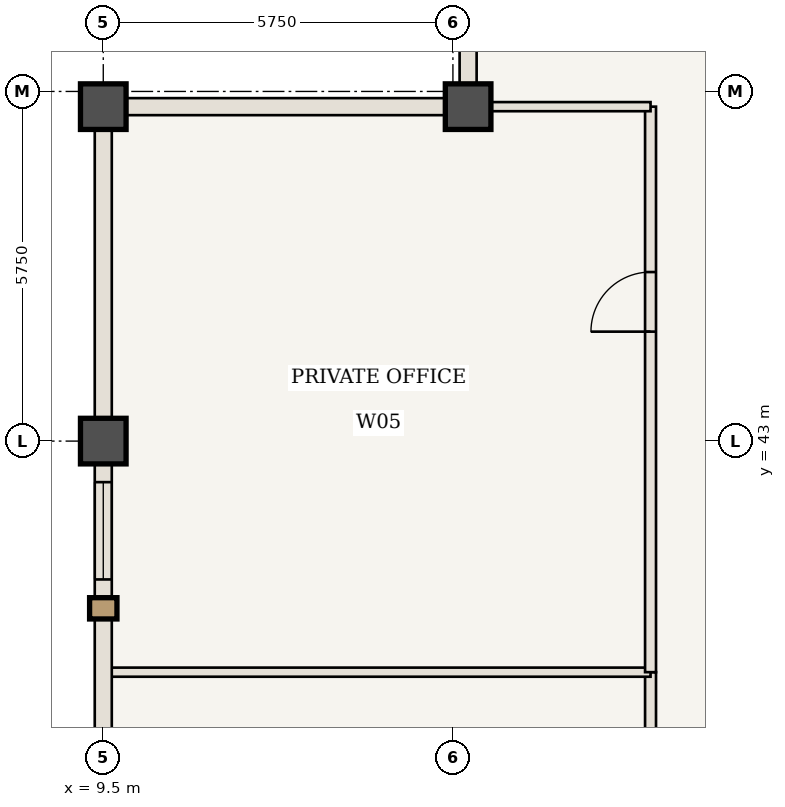
"""IFC4 building model, lengths in metres.
Left out: names, types, materials, properties, quantities, classifications, styles, units other than length and angle.
Written with IfcOpenShell. Run it as: python <this file> out.ifc"""

import sys

from ifc_helpers import new_model, si_unit, direction, frame, frame_2d, origin, origin_2d, place, context, subcontext, project, spatial, rectangle, extrude, element, fill, save


model = new_model("IFC4")
c1 = context("Model", 3, precision=1e-05, world=origin(), true_north=direction((0.0, 1.0)))
c2 = subcontext(c1, "Body", "Model", "MODEL_VIEW")
j1 = project(units=[si_unit("LENGTHUNIT", "METRE"), si_unit("PLANEANGLEUNIT", "RADIAN")], contexts=[c1])
p1 = place(None, origin())
s1 = spatial("IfcSite", under=j1, at=p1, CompositionType="ELEMENT")
p2 = place(p1, origin())
s2 = spatial("IfcBuilding", under=s1, at=p2, CompositionType="ELEMENT")
p3 = place(p2, frame((0.0, 0.0, 289.1)))
s3 = spatial("IfcBuildingStorey", under=s2, at=p3, CompositionType="ELEMENT", Elevation=289.1)
for number, where, z_axis, x_axis in (
    (1, (15.5, 48.5, 0.0), (0.0, 0.0, 1.0), (1.0, 0.0, 0.0)),
    (2, (9.5, 48.5, 0.0), (0.0, 0.0, 1.0), (1.0, 0.0, 0.0)),
    (3, (9.5, 43.0, 0.0), (0.0, 0.0, 1.0), (1.0, 0.0, 0.0)),
):
    element("IfcColumn", number, at=place(p3, frame(where, z_axis=z_axis, x_axis=x_axis)), inside=s3, PredefinedType="COLUMN", context=c2, shape_type="SweptSolid", body=[
        extrude(rectangle(XDim=0.75, YDim=0.75, at=origin_2d()), origin(), (0.0, 0.0, 1.0), 3.85),
    ])
p4 = place(p3, frame((18.5, 32.8, 0.0), z_axis=(0.0, 0.0, 1.0), x_axis=(0.0, 1.0, 0.0)))
e4 = element("IfcWall", 4, at=p4, inside=s3, PredefinedType="STANDARD", context=c2, shape_type="SweptSolid", body=[
    extrude(rectangle(XDim=6.4, YDim=0.18, at=frame_2d((3.2, 0.0))), origin(), (0.0, 0.0, 1.0), 3.685),
])
p5 = place(p4, frame((2.7, 0.0, 0.0)))
e5 = element("IfcOpeningElement", 5, at=p5, cuts=e4, PredefinedType="OPENING", context=c2, shape_type="SweptSolid", body=[
    extrude(rectangle(XDim=0.98, YDim=2.2, at=frame_2d((0.49, 1.1))), frame((0.0, 0.1, 0.0), z_axis=(0.0, -1.0, 0.0), x_axis=(1.0, 0.0, 0.0)), (0.0, 0.0, 1.0), 0.2),
])
p6 = place(p3, frame((9.56, 39.2, 0.0), z_axis=(0.0, 0.0, 1.0), x_axis=(1.0, 0.0, 0.0)))
e6 = element("IfcWall", 6, at=p6, inside=s3, PredefinedType="STANDARD", context=c2, shape_type="SweptSolid", body=[
    extrude(rectangle(XDim=8.94, YDim=0.15, at=frame_2d((4.47, 0.0))), origin(), (0.0, 0.0, 1.0), 3.685),
])
p7 = place(p3, frame((18.5, 39.2, 0.0), z_axis=(0.0, 0.0, 1.0), x_axis=(0.0, 1.0, 0.0)))
e7 = element("IfcWall", 7, at=p7, inside=s3, PredefinedType="STANDARD", context=c2, shape_type="SweptSolid", body=[
    extrude(rectangle(XDim=9.3, YDim=0.18, at=frame_2d((4.65, 0.0))), origin(), (0.0, 0.0, 1.0), 3.685),
])
p8 = place(p7, frame((5.6, 0.0, 0.0)))
e8 = element("IfcOpeningElement", 8, at=p8, cuts=e7, PredefinedType="OPENING", context=c2, shape_type="SweptSolid", body=[
    extrude(rectangle(XDim=0.98, YDim=2.2, at=frame_2d((0.49, 1.1))), frame((0.0, 0.1, 0.0), z_axis=(0.0, -1.0, 0.0), x_axis=(1.0, 0.0, 0.0)), (0.0, 0.0, 1.0), 0.2),
])
p9 = place(p3, frame((15.5, 48.5, 0.0), z_axis=(0.0, 0.0, 1.0), x_axis=(1.0, 0.0, 0.0)))
e9 = element("IfcWall", 9, at=p9, inside=s3, PredefinedType="STANDARD", context=c2, shape_type="SweptSolid", body=[
    extrude(rectangle(XDim=3.0, YDim=0.15, at=frame_2d((1.5, 0.0))), origin(), (0.0, 0.0, 1.0), 3.685),
])
p10 = place(p3, frame((9.5, 37.5, 0.0), z_axis=(0.0, 0.0, 1.0), x_axis=(0.0, 1.0, 0.0)))
e10 = element("IfcWall", 10, at=p10, inside=s3, PredefinedType="USERDEFINED", context=c2, shape_type="SweptSolid", body=[
    extrude(rectangle(XDim=5.5, YDim=0.28, at=frame_2d((2.75, 0.0))), origin(), (0.0, 0.0, 1.0), 2.985),
])
p11 = place(p10, frame((3.225, 0.0, 0.85)))
e11 = element("IfcOpeningElement", 11, at=p11, cuts=e10, PredefinedType="OPENING", context=c2, shape_type="SweptSolid", body=[
    extrude(rectangle(XDim=1.6, YDim=1.935, at=frame_2d((0.8, 0.968))), frame((0.0, 0.15, 0.0), z_axis=(0.0, -1.0, 0.0), x_axis=(1.0, 0.0, 0.0)), (0.0, 0.0, 1.0), 0.3),
])
p12 = place(p3, frame((9.5, 43.0, 0.0), z_axis=(0.0, 0.0, 1.0), x_axis=(0.0, 1.0, 0.0)))
e12 = element("IfcWall", 12, at=p12, inside=s3, PredefinedType="USERDEFINED", context=c2, shape_type="SweptSolid", body=[
    extrude(rectangle(XDim=5.5, YDim=0.28, at=frame_2d((2.75, 0.0))), origin(), (0.0, 0.0, 1.0), 2.985),
])
for number, where, z_axis, x_axis in (
    (13, (15.5, 48.5, 0.0), (0.0, 0.0, 1.0), (0.0, 1.0, 0.0)),
    (14, (9.5, 48.5, 0.0), (0.0, 0.0, 1.0), (1.0, 0.0, 0.0)),
):
    element("IfcWall", number, at=place(p3, frame(where, z_axis=z_axis, x_axis=x_axis)), inside=s3, PredefinedType="USERDEFINED", context=c2, shape_type="SweptSolid", body=[
        extrude(rectangle(XDim=6.0, YDim=0.28, at=frame_2d((3.0, 0.0))), origin(), (0.0, 0.0, 1.0), 2.985),
    ])
p13 = place(p8, origin())
e15 = element("IfcDoor", 15, at=p13, inside=s3, OperationType="SINGLE_SWING_LEFT", PredefinedType="DOOR", context=c2, shape_type="SweptSolid", body=[
    extrude(rectangle(XDim=0.98, YDim=2.2, at=frame_2d((0.49, 1.1))), frame((0.0, 0.025, 0.0), z_axis=(0.0, -1.0, 0.0), x_axis=(1.0, 0.0, 0.0)), (0.0, 0.0, 1.0), 0.05),
])
fill(e8, e15)
p14 = place(p11, origin())
e16 = element("IfcWindow", 16, at=p14, inside=s3, PartitioningType="SINGLE_PANEL", PredefinedType="WINDOW", context=c2, shape_type="SweptSolid", body=[
    extrude(rectangle(XDim=1.6, YDim=1.935, at=frame_2d((0.8, 0.968))), frame((0.0, 0.03, 0.0), z_axis=(0.0, -1.0, 0.0), x_axis=(1.0, 0.0, 0.0)), (0.0, 0.0, 1.0), 0.06),
])
fill(e11, e16)
save(model, sys.argv[1])
